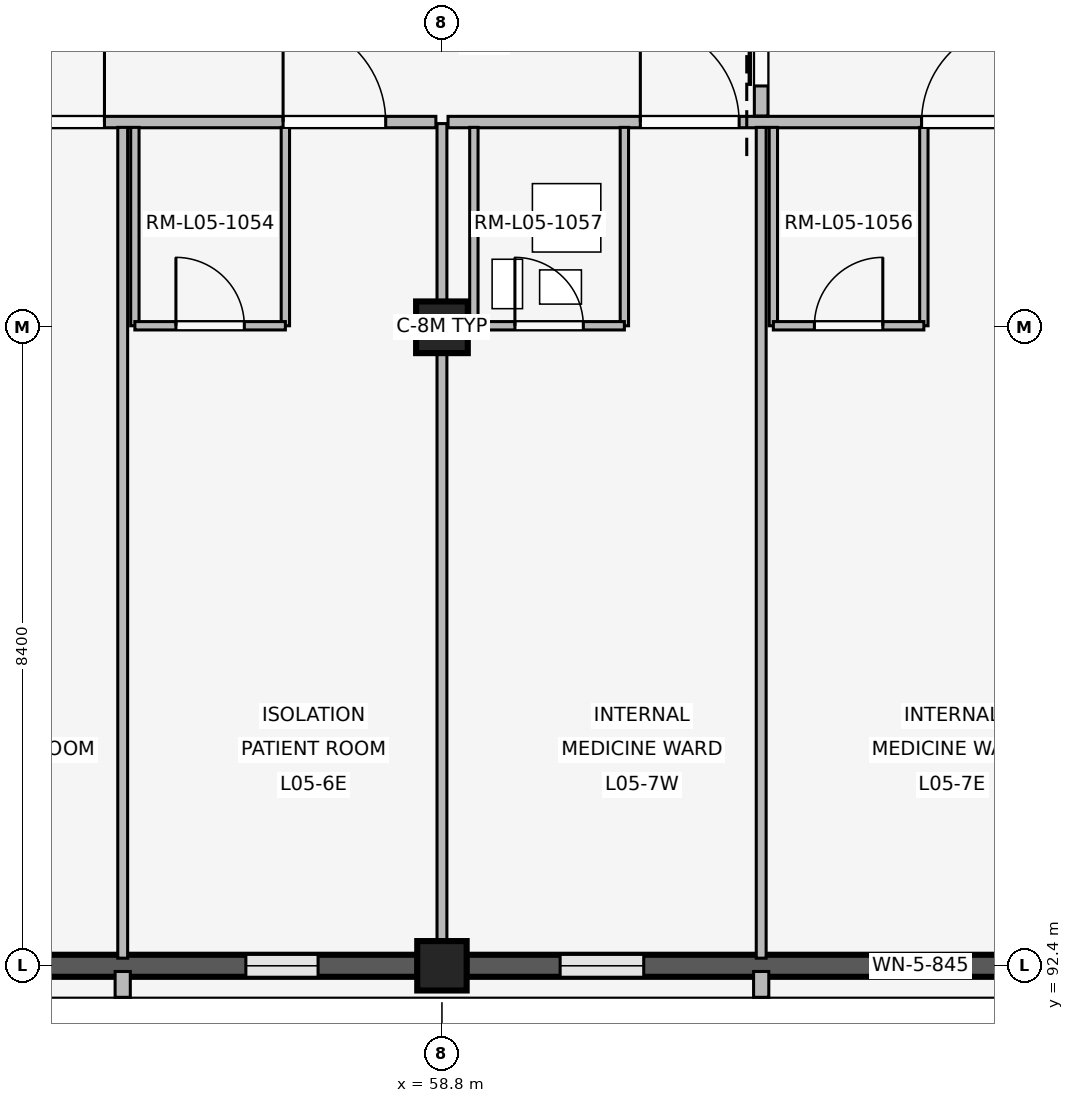
"""IFC4 building model, lengths in metres.
Left out: names, types, materials, properties, quantities, classifications, styles, units other than length and angle.
Written with IfcOpenShell. Run it as: python <this file> out.ifc"""

import sys

from ifc_helpers import new_model, si_unit, direction, frame, frame_2d, origin, origin_2d, place, context, subcontext, project, spatial, rectangle, extrude, element, fill, save


model = new_model("IFC4")
c1 = context("Model", 3, precision=1e-05, world=origin(), true_north=direction((0.0, 1.0)))
c2 = subcontext(c1, "Body", "Model", "MODEL_VIEW")
j1 = project(units=[si_unit("LENGTHUNIT", "METRE"), si_unit("PLANEANGLEUNIT", "RADIAN")], contexts=[c1])
p1 = place(None, origin())
s1 = spatial("IfcSite", under=j1, at=p1, CompositionType="ELEMENT")
p2 = place(p1, origin())
s2 = spatial("IfcBuilding", under=s1, at=p2, CompositionType="ELEMENT")
p3 = place(p2, frame((0.0, 0.0, 20.4)))
s3 = spatial("IfcBuildingStorey", under=s2, at=p3, CompositionType="ELEMENT", Elevation=20.4)
p4 = place(p3, frame((58.8, 92.4, 0.0), z_axis=(0.0, 0.0, 1.0), x_axis=(1.0, 0.0, 0.0)))
e1 = element("IfcColumn", 1, at=p4, inside=s3, PredefinedType="COLUMN", context=c2, shape_type="SweptSolid", body=[
    extrude(rectangle(XDim=0.65, YDim=0.65, at=origin_2d()), origin(), (0.0, 0.0, 1.0), 4.2),
])
p5 = place(p3, frame((58.8, 100.8, 0.0), z_axis=(0.0, 0.0, 1.0), x_axis=(1.0, 0.0, 0.0)))
e2 = element("IfcColumn", 2, at=p5, inside=s3, PredefinedType="COLUMN", context=c2, shape_type="SweptSolid", body=[
    extrude(rectangle(XDim=0.68, YDim=0.68, at=origin_2d()), origin(), (0.0, 0.0, 1.0), 4.2),
])
p6 = place(p3, frame((58.48, 92.4, 0.0), z_axis=(0.0, 0.0, 1.0), x_axis=(-1.0, 0.0, 0.0)))
e3 = element("IfcWall", 3, at=p6, inside=s3, PredefinedType="SOLIDWALL", context=c2, shape_type="SweptSolid", body=[
    extrude(rectangle(XDim=7.76, YDim=0.29, at=frame_2d((3.88, 0.0))), origin(), (0.0, 0.0, 1.0), 3.34),
])
p7 = place(p6, frame((1.31, 0.0, 0.85)))
e4 = element("IfcOpeningElement", 4, at=p7, cuts=e3, PredefinedType="OPENING", context=c2, shape_type="SweptSolid", body=[
    extrude(rectangle(XDim=0.95, YDim=1.6, at=frame_2d((0.475, 0.8))), frame((0.0, 0.155, 0.0), z_axis=(0.0, -1.0, 0.0), x_axis=(1.0, 0.0, 0.0)), (0.0, 0.0, 1.0), 0.31),
])
p8 = place(p6, frame((5.5, 0.0, 0.85)))
e5 = element("IfcOpeningElement", 5, at=p8, cuts=e3, PredefinedType="OPENING", context=c2, shape_type="SweptSolid", body=[
    extrude(rectangle(XDim=0.95, YDim=1.6, at=frame_2d((0.475, 0.8))), frame((0.0, 0.155, 0.0), z_axis=(0.0, -1.0, 0.0), x_axis=(1.0, 0.0, 0.0)), (0.0, 0.0, 1.0), 0.31),
])
p9 = place(p3, frame((54.6, 92.325, 0.0), z_axis=(0.0, 0.0, 1.0), x_axis=(0.0, -1.0, 0.0)))
e6 = element("IfcWall", 6, at=p9, inside=s3, PredefinedType="ELEMENTEDWALL", context=c2, shape_type="SweptSolid", body=[
    extrude(rectangle(XDim=0.34, YDim=0.2, at=frame_2d((0.17, 0.0))), origin(), (0.0, 0.0, 1.0), 3.32),
])
p10 = place(p3, frame((66.88, 92.4, 0.0), z_axis=(0.0, 0.0, 1.0), x_axis=(-1.0, 0.0, 0.0)))
e7 = element("IfcWall", 7, at=p10, inside=s3, PredefinedType="SOLIDWALL", context=c2, shape_type="SweptSolid", body=[
    extrude(rectangle(XDim=7.76, YDim=0.29, at=frame_2d((3.88, 0.0))), origin(), (0.0, 0.0, 1.0), 3.34),
])
p11 = place(p10, frame((1.235, 0.0, 0.85)))
e8 = element("IfcOpeningElement", 8, at=p11, cuts=e7, PredefinedType="OPENING", context=c2, shape_type="SweptSolid", body=[
    extrude(rectangle(XDim=1.1, YDim=1.6, at=frame_2d((0.55, 0.8))), frame((0.0, 0.155, 0.0), z_axis=(0.0, -1.0, 0.0), x_axis=(1.0, 0.0, 0.0)), (0.0, 0.0, 1.0), 0.31),
])
p12 = place(p10, frame((5.425, 0.0, 0.85)))
e9 = element("IfcOpeningElement", 9, at=p12, cuts=e7, PredefinedType="OPENING", context=c2, shape_type="SweptSolid", body=[
    extrude(rectangle(XDim=1.1, YDim=1.6, at=frame_2d((0.55, 0.8))), frame((0.0, 0.155, 0.0), z_axis=(0.0, -1.0, 0.0), x_axis=(1.0, 0.0, 0.0)), (0.0, 0.0, 1.0), 0.31),
])
p13 = place(p3, frame((63.0, 92.325, 0.0), z_axis=(0.0, 0.0, 1.0), x_axis=(0.0, -1.0, 0.0)))
e10 = element("IfcWall", 10, at=p13, inside=s3, PredefinedType="ELEMENTEDWALL", context=c2, shape_type="SweptSolid", body=[
    extrude(rectangle(XDim=0.34, YDim=0.2, at=frame_2d((0.17, 0.0))), origin(), (0.0, 0.0, 1.0), 3.32),
])
p14 = place(p3, frame((50.76, 103.5, 0.0), z_axis=(0.0, 0.0, 1.0), x_axis=(1.0, 0.0, 0.0)))
e11 = element("IfcWall", 11, at=p14, inside=s3, PredefinedType="PARTITIONING", context=c2, shape_type="SweptSolid", body=[
    extrude(rectangle(XDim=7.96, YDim=0.15, at=frame_2d((3.98, 0.0))), origin(), (0.0, 0.0, 1.0), 3.32),
])
p15 = place(p14, frame((2.25, 0.0, 0.0)))
e12 = element("IfcOpeningElement", 12, at=p15, cuts=e11, PredefinedType="OPENING", context=c2, shape_type="SweptSolid", body=[
    extrude(rectangle(XDim=1.35, YDim=2.25, at=frame_2d((0.675, 1.125))), frame((0.0, 0.085, 0.0), z_axis=(0.0, -1.0, 0.0), x_axis=(1.0, 0.0, 0.0)), (0.0, 0.0, 1.0), 0.17),
])
p16 = place(p14, frame((5.95, 0.0, 0.0)))
e13 = element("IfcOpeningElement", 13, at=p16, cuts=e11, PredefinedType="OPENING", context=c2, shape_type="SweptSolid", body=[
    extrude(rectangle(XDim=1.35, YDim=2.25, at=frame_2d((0.675, 1.125))), frame((0.0, 0.085, 0.0), z_axis=(0.0, -1.0, 0.0), x_axis=(1.0, 0.0, 0.0)), (0.0, 0.0, 1.0), 0.17),
])
p17 = place(p3, frame((54.6, 92.5, 0.0), z_axis=(0.0, 0.0, 1.0), x_axis=(0.0, 1.0, 0.0)))
e14 = element("IfcWall", 14, at=p17, inside=s3, PredefinedType="PARTITIONING", context=c2, shape_type="SweptSolid", body=[
    extrude(rectangle(XDim=10.93, YDim=0.13, at=frame_2d((5.465, 0.0))), origin(), (0.0, 0.0, 1.0), 3.32),
])
for number, where, z_axis, x_axis in (
    (15, (54.76, 100.82, 0.0), (0.0, 0.0, 1.0), (0.0, 1.0, 0.0)),
    (16, (56.74, 100.82, 0.0), (0.0, 0.0, 1.0), (0.0, 1.0, 0.0)),
):
    element("IfcWall", number, at=place(p3, frame(where, z_axis=z_axis, x_axis=x_axis)), inside=s3, PredefinedType="PARTITIONING", context=c2, shape_type="SweptSolid", body=[
        extrude(rectangle(XDim=2.61, YDim=0.11, at=frame_2d((1.305, 0.0))), origin(), (0.0, 0.0, 1.0), 3.32),
    ])
p18 = place(p3, frame((54.76, 100.82, 0.0), z_axis=(0.0, 0.0, 1.0), x_axis=(1.0, 0.0, 0.0)))
e17 = element("IfcWall", 17, at=p18, inside=s3, PredefinedType="PARTITIONING", context=c2, shape_type="SweptSolid", body=[
    extrude(rectangle(XDim=1.98, YDim=0.11, at=frame_2d((0.99, 0.0))), origin(), (0.0, 0.0, 1.0), 3.32),
])
p19 = place(p18, frame((0.54, 0.0, 0.0)))
e18 = element("IfcOpeningElement", 18, at=p19, cuts=e17, PredefinedType="OPENING", context=c2, shape_type="SweptSolid", body=[
    extrude(rectangle(XDim=0.9, YDim=2.1, at=frame_2d((0.45, 1.05))), frame((0.0, 0.065, 0.0), z_axis=(0.0, -1.0, 0.0), x_axis=(1.0, 0.0, 0.0)), (0.0, 0.0, 1.0), 0.13),
])
p20 = place(p3, frame((58.8, 92.54, 0.0), z_axis=(0.0, 0.0, 1.0), x_axis=(0.0, 1.0, 0.0)))
e19 = element("IfcWall", 19, at=p20, inside=s3, PredefinedType="PARTITIONING", context=c2, shape_type="SweptSolid", body=[
    extrude(rectangle(XDim=10.94, YDim=0.13, at=frame_2d((5.47, 0.0))), origin(), (0.0, 0.0, 1.0), 3.32),
])
p21 = place(p3, frame((58.88, 103.5, 0.0), z_axis=(0.0, 0.0, 1.0), x_axis=(1.0, 0.0, 0.0)))
e20 = element("IfcWall", 20, at=p21, inside=s3, PredefinedType="PARTITIONING", context=c2, shape_type="SweptSolid", body=[
    extrude(rectangle(XDim=8.24, YDim=0.15, at=frame_2d((4.12, 0.0))), origin(), (0.0, 0.0, 1.0), 3.32),
])
p22 = place(p21, frame((2.53, 0.0, 0.0)))
e21 = element("IfcOpeningElement", 21, at=p22, cuts=e20, PredefinedType="OPENING", context=c2, shape_type="SweptSolid", body=[
    extrude(rectangle(XDim=1.3, YDim=2.25, at=frame_2d((0.65, 1.125))), frame((0.0, 0.085, 0.0), z_axis=(0.0, -1.0, 0.0), x_axis=(1.0, 0.0, 0.0)), (0.0, 0.0, 1.0), 0.17),
])
p23 = place(p21, frame((6.23, 0.0, 0.0)))
e22 = element("IfcOpeningElement", 22, at=p23, cuts=e20, PredefinedType="OPENING", context=c2, shape_type="SweptSolid", body=[
    extrude(rectangle(XDim=1.3, YDim=2.25, at=frame_2d((0.65, 1.125))), frame((0.0, 0.085, 0.0), z_axis=(0.0, -1.0, 0.0), x_axis=(1.0, 0.0, 0.0)), (0.0, 0.0, 1.0), 0.17),
])
p24 = place(p3, frame((63.0, 92.5, 0.0), z_axis=(0.0, 0.0, 1.0), x_axis=(0.0, 1.0, 0.0)))
e23 = element("IfcWall", 23, at=p24, inside=s3, PredefinedType="PARTITIONING", context=c2, shape_type="SweptSolid", body=[
    extrude(rectangle(XDim=10.93, YDim=0.13, at=frame_2d((5.465, 0.0))), origin(), (0.0, 0.0, 1.0), 3.32),
])
for number, where, z_axis, x_axis in (
    (24, (59.22, 100.82, 0.0), (0.0, 0.0, 1.0), (0.0, 1.0, 0.0)),
    (25, (61.2, 100.82, 0.0), (0.0, 0.0, 1.0), (0.0, 1.0, 0.0)),
):
    element("IfcWall", number, at=place(p3, frame(where, z_axis=z_axis, x_axis=x_axis)), inside=s3, PredefinedType="PARTITIONING", context=c2, shape_type="SweptSolid", body=[
        extrude(rectangle(XDim=2.61, YDim=0.11, at=frame_2d((1.305, 0.0))), origin(), (0.0, 0.0, 1.0), 3.32),
    ])
p25 = place(p3, frame((59.22, 100.82, 0.0), z_axis=(0.0, 0.0, 1.0), x_axis=(1.0, 0.0, 0.0)))
e26 = element("IfcWall", 26, at=p25, inside=s3, PredefinedType="PARTITIONING", context=c2, shape_type="SweptSolid", body=[
    extrude(rectangle(XDim=1.98, YDim=0.11, at=frame_2d((0.99, 0.0))), origin(), (0.0, 0.0, 1.0), 3.32),
])
p26 = place(p25, frame((0.54, 0.0, 0.0)))
e27 = element("IfcOpeningElement", 27, at=p26, cuts=e26, PredefinedType="OPENING", context=c2, shape_type="SweptSolid", body=[
    extrude(rectangle(XDim=0.9, YDim=2.1, at=frame_2d((0.45, 1.05))), frame((0.0, 0.065, 0.0), z_axis=(0.0, -1.0, 0.0), x_axis=(1.0, 0.0, 0.0)), (0.0, 0.0, 1.0), 0.13),
])
for number, where, z_axis, x_axis in (
    (28, (63.16, 100.82, 0.0), (0.0, 0.0, 1.0), (0.0, 1.0, 0.0)),
    (29, (65.14, 100.82, 0.0), (0.0, 0.0, 1.0), (0.0, 1.0, 0.0)),
):
    element("IfcWall", number, at=place(p3, frame(where, z_axis=z_axis, x_axis=x_axis)), inside=s3, PredefinedType="PARTITIONING", context=c2, shape_type="SweptSolid", body=[
        extrude(rectangle(XDim=2.61, YDim=0.11, at=frame_2d((1.305, 0.0))), origin(), (0.0, 0.0, 1.0), 3.32),
    ])
p27 = place(p3, frame((63.16, 100.82, 0.0), z_axis=(0.0, 0.0, 1.0), x_axis=(1.0, 0.0, 0.0)))
e30 = element("IfcWall", 30, at=p27, inside=s3, PredefinedType="PARTITIONING", context=c2, shape_type="SweptSolid", body=[
    extrude(rectangle(XDim=1.98, YDim=0.11, at=frame_2d((0.99, 0.0))), origin(), (0.0, 0.0, 1.0), 3.32),
])
p28 = place(p27, frame((0.54, 0.0, 0.0)))
e31 = element("IfcOpeningElement", 31, at=p28, cuts=e30, PredefinedType="OPENING", context=c2, shape_type="SweptSolid", body=[
    extrude(rectangle(XDim=0.9, YDim=2.1, at=frame_2d((0.45, 1.05))), frame((0.0, 0.065, 0.0), z_axis=(0.0, -1.0, 0.0), x_axis=(1.0, 0.0, 0.0)), (0.0, 0.0, 1.0), 0.13),
])
p29 = place(p3, frame((63.0, 103.58, 0.0), z_axis=(0.0, 0.0, 1.0), x_axis=(0.0, 1.0, 0.0)))
e32 = element("IfcWall", 32, at=p29, inside=s3, PredefinedType="PARTITIONING", context=c2, shape_type="SweptSolid", body=[
    extrude(rectangle(XDim=2.84, YDim=0.18, at=frame_2d((1.42, 0.0))), origin(), (0.0, 0.0, 1.0), 3.32),
])
p30 = place(p29, frame((0.395, 0.0, 0.0)))
e33 = element("IfcOpeningElement", 33, at=p30, cuts=e32, PredefinedType="OPENING", context=c2, shape_type="SweptSolid", body=[
    extrude(rectangle(XDim=2.05, YDim=2.35, at=frame_2d((1.025, 1.175))), frame((0.0, 0.1, 0.0), z_axis=(0.0, -1.0, 0.0), x_axis=(1.0, 0.0, 0.0)), (0.0, 0.0, 1.0), 0.2),
])
p31 = place(p7, origin())
e34 = element("IfcWindow", 34, at=p31, inside=s3, PartitioningType="SINGLE_PANEL", PredefinedType="WINDOW", context=c2, shape_type="SweptSolid", body=[
    extrude(rectangle(XDim=0.95, YDim=1.6, at=frame_2d((0.475, 0.8))), frame((0.0, 0.03, 0.0), z_axis=(0.0, -1.0, 0.0), x_axis=(1.0, 0.0, 0.0)), (0.0, 0.0, 1.0), 0.06),
])
fill(e4, e34)
p32 = place(p11, origin())
e35 = element("IfcWindow", 35, at=p32, inside=s3, PartitioningType="SINGLE_PANEL", PredefinedType="WINDOW", context=c2, shape_type="SweptSolid", body=[
    extrude(rectangle(XDim=1.1, YDim=1.6, at=frame_2d((0.55, 0.8))), frame((0.0, 0.03, 0.0), z_axis=(0.0, -1.0, 0.0), x_axis=(1.0, 0.0, 0.0)), (0.0, 0.0, 1.0), 0.06),
])
fill(e8, e35)
p33 = place(p12, origin())
e36 = element("IfcWindow", 36, at=p33, inside=s3, PartitioningType="SINGLE_PANEL", PredefinedType="WINDOW", context=c2, shape_type="SweptSolid", body=[
    extrude(rectangle(XDim=1.1, YDim=1.6, at=frame_2d((0.55, 0.8))), frame((0.0, 0.03, 0.0), z_axis=(0.0, -1.0, 0.0), x_axis=(1.0, 0.0, 0.0)), (0.0, 0.0, 1.0), 0.06),
])
fill(e9, e36)
p34 = place(p15, origin())
e37 = element("IfcDoor", 37, at=p34, inside=s3, OperationType="SINGLE_SWING_RIGHT", PredefinedType="DOOR", context=c2, shape_type="SweptSolid", body=[
    extrude(rectangle(XDim=1.35, YDim=2.25, at=frame_2d((0.675, 1.125))), frame((0.0, 0.025, 0.0), z_axis=(0.0, -1.0, 0.0), x_axis=(1.0, 0.0, 0.0)), (0.0, 0.0, 1.0), 0.05),
])
fill(e12, e37)
p35 = place(p16, origin())
e38 = element("IfcDoor", 38, at=p35, inside=s3, OperationType="SINGLE_SWING_LEFT", PredefinedType="DOOR", context=c2, shape_type="SweptSolid", body=[
    extrude(rectangle(XDim=1.35, YDim=2.25, at=frame_2d((0.675, 1.125))), frame((0.0, 0.025, 0.0), z_axis=(0.0, -1.0, 0.0), x_axis=(1.0, 0.0, 0.0)), (0.0, 0.0, 1.0), 0.05),
])
fill(e13, e38)
p36 = place(p19, origin())
e39 = element("IfcDoor", 39, at=p36, inside=s3, OperationType="SINGLE_SWING_LEFT", PredefinedType="DOOR", context=c2, shape_type="SweptSolid", body=[
    extrude(rectangle(XDim=0.9, YDim=2.1, at=frame_2d((0.45, 1.05))), frame((0.0, 0.025, 0.0), z_axis=(0.0, -1.0, 0.0), x_axis=(1.0, 0.0, 0.0)), (0.0, 0.0, 1.0), 0.05),
])
fill(e18, e39)
p37 = place(p22, origin())
e40 = element("IfcDoor", 40, at=p37, inside=s3, OperationType="SINGLE_SWING_LEFT", PredefinedType="DOOR", context=c2, shape_type="SweptSolid", body=[
    extrude(rectangle(XDim=1.3, YDim=2.25, at=frame_2d((0.65, 1.125))), frame((0.0, 0.025, 0.0), z_axis=(0.0, -1.0, 0.0), x_axis=(1.0, 0.0, 0.0)), (0.0, 0.0, 1.0), 0.05),
])
fill(e21, e40)
p38 = place(p23, origin())
e41 = element("IfcDoor", 41, at=p38, inside=s3, OperationType="SINGLE_SWING_RIGHT", PredefinedType="DOOR", context=c2, shape_type="SweptSolid", body=[
    extrude(rectangle(XDim=1.3, YDim=2.25, at=frame_2d((0.65, 1.125))), frame((0.0, 0.025, 0.0), z_axis=(0.0, -1.0, 0.0), x_axis=(1.0, 0.0, 0.0)), (0.0, 0.0, 1.0), 0.05),
])
fill(e22, e41)
p39 = place(p26, origin())
e42 = element("IfcDoor", 42, at=p39, inside=s3, OperationType="SINGLE_SWING_LEFT", PredefinedType="DOOR", context=c2, shape_type="SweptSolid", body=[
    extrude(rectangle(XDim=0.9, YDim=2.1, at=frame_2d((0.45, 1.05))), frame((0.0, 0.025, 0.0), z_axis=(0.0, -1.0, 0.0), x_axis=(1.0, 0.0, 0.0)), (0.0, 0.0, 1.0), 0.05),
])
fill(e27, e42)
p40 = place(p28, origin())
e43 = element("IfcDoor", 43, at=p40, inside=s3, OperationType="SINGLE_SWING_RIGHT", PredefinedType="DOOR", context=c2, shape_type="SweptSolid", body=[
    extrude(rectangle(XDim=0.9, YDim=2.1, at=frame_2d((0.45, 1.05))), frame((0.0, 0.025, 0.0), z_axis=(0.0, -1.0, 0.0), x_axis=(1.0, 0.0, 0.0)), (0.0, 0.0, 1.0), 0.05),
])
fill(e31, e43)
p41 = place(p30, origin())
e44 = element("IfcDoor", 44, at=p41, inside=s3, OperationType="SLIDING_TO_LEFT", PredefinedType="DOOR", context=c2, shape_type="SweptSolid", body=[
    extrude(rectangle(XDim=2.05, YDim=2.35, at=frame_2d((1.025, 1.175))), frame((0.0, 0.025, 0.0), z_axis=(0.0, -1.0, 0.0), x_axis=(1.0, 0.0, 0.0)), (0.0, 0.0, 1.0), 0.05),
])
fill(e33, e44)
save(model, sys.argv[1])
